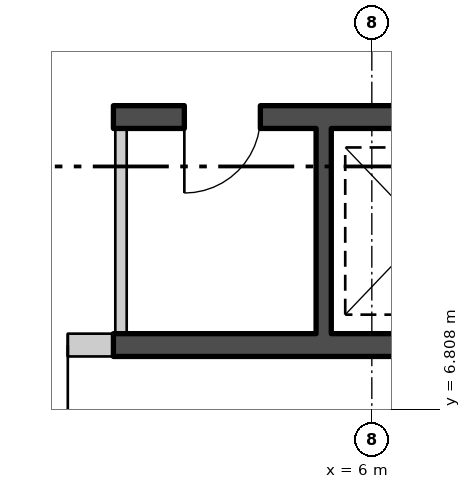
"""IFC4 building model, lengths in metres.
Left out: names, types, materials, properties, quantities, classifications, styles, units other than length and angle.
Written with IfcOpenShell. Run it as: python <this file> out.ifc"""

import sys

from ifc_helpers import new_model, si_unit, direction, frame, frame_2d, origin, place, context, subcontext, project, spatial, polyline, rectangle, outline, extrude, element, fill, save


model = new_model("IFC4")
c1 = context("Model", 3, precision=1e-05, world=origin(), true_north=direction((0.0, 1.0)))
c2 = subcontext(c1, "Body", "Model", "MODEL_VIEW")
j1 = project(units=[si_unit("LENGTHUNIT", "METRE"), si_unit("PLANEANGLEUNIT", "RADIAN")], contexts=[c1])
p1 = place(None, origin())
s1 = spatial("IfcSite", under=j1, at=p1, CompositionType="ELEMENT")
p2 = place(p1, origin())
s2 = spatial("IfcBuilding", under=s1, at=p2, CompositionType="ELEMENT")
p3 = place(p2, frame((0.0, 0.0, 227.7)))
s3 = spatial("IfcBuildingStorey", under=s2, at=p3, CompositionType="ELEMENT", Elevation=227.7)
p4 = place(p3, frame((3.21, -25.189, -0.18), z_axis=(0.0, 0.0, 1.0), x_axis=(0.499999194392, 0.866025868902, 0.0)))
e1 = element("IfcWall", 1, at=p4, inside=s3, PredefinedType="SOLIDWALL", context=c2, shape_type="SweptSolid", body=[
    extrude(outline(polyline([(-0.13, -0.225), (45.86, -0.225), (45.6, 0.225), (0.13, 0.225), (-0.13, -0.225)])), origin(), (0.0, 0.0, 1.0), 3.68),
])
p5 = place(p4, frame((1.424, 0.0, 1.08)))
e2 = element("IfcOpeningElement", 2, at=p5, cuts=e1, PredefinedType="OPENING", context=c2, shape_type="SweptSolid", body=[
    extrude(rectangle(XDim=2.4, YDim=2.0, at=frame_2d((1.2, 1.0))), frame((0.0, 0.235, 0.0), z_axis=(0.0, -1.0, 0.0), x_axis=(1.0, 0.0, 0.0)), (0.0, 0.0, 1.0), 0.47),
])
p6 = place(p4, frame((5.892, 0.0, 1.08)))
e3 = element("IfcOpeningElement", 3, at=p6, cuts=e1, PredefinedType="OPENING", context=c2, shape_type="SweptSolid", body=[
    extrude(rectangle(XDim=2.4, YDim=2.0, at=frame_2d((1.2, 1.0))), frame((0.0, 0.235, 0.0), z_axis=(0.0, -1.0, 0.0), x_axis=(1.0, 0.0, 0.0)), (0.0, 0.0, 1.0), 0.47),
])
p7 = place(p4, frame((10.399, 0.0, 1.08)))
e4 = element("IfcOpeningElement", 4, at=p7, cuts=e1, PredefinedType="OPENING", context=c2, shape_type="SweptSolid", body=[
    extrude(rectangle(XDim=2.4, YDim=2.0, at=frame_2d((1.2, 1.0))), frame((0.0, 0.235, 0.0), z_axis=(0.0, -1.0, 0.0), x_axis=(1.0, 0.0, 0.0)), (0.0, 0.0, 1.0), 0.47),
])
p8 = place(p4, frame((14.905, 0.0, 1.08)))
e5 = element("IfcOpeningElement", 5, at=p8, cuts=e1, PredefinedType="OPENING", context=c2, shape_type="SweptSolid", body=[
    extrude(rectangle(XDim=2.4, YDim=2.0, at=frame_2d((1.2, 1.0))), frame((0.0, 0.235, 0.0), z_axis=(0.0, -1.0, 0.0), x_axis=(1.0, 0.0, 0.0)), (0.0, 0.0, 1.0), 0.47),
])
p9 = place(p4, frame((19.412, 0.0, 1.08)))
e6 = element("IfcOpeningElement", 6, at=p9, cuts=e1, PredefinedType="OPENING", context=c2, shape_type="SweptSolid", body=[
    extrude(rectangle(XDim=2.4, YDim=2.0, at=frame_2d((1.2, 1.0))), frame((0.0, 0.235, 0.0), z_axis=(0.0, -1.0, 0.0), x_axis=(1.0, 0.0, 0.0)), (0.0, 0.0, 1.0), 0.47),
])
p10 = place(p4, frame((23.918, 0.0, 1.08)))
e7 = element("IfcOpeningElement", 7, at=p10, cuts=e1, PredefinedType="OPENING", context=c2, shape_type="SweptSolid", body=[
    extrude(rectangle(XDim=2.4, YDim=2.0, at=frame_2d((1.2, 1.0))), frame((0.0, 0.235, 0.0), z_axis=(0.0, -1.0, 0.0), x_axis=(1.0, 0.0, 0.0)), (0.0, 0.0, 1.0), 0.47),
])
p11 = place(p4, frame((32.932, 0.0, 1.08)))
e8 = element("IfcOpeningElement", 8, at=p11, cuts=e1, PredefinedType="OPENING", context=c2, shape_type="SweptSolid", body=[
    extrude(rectangle(XDim=2.4, YDim=2.0, at=frame_2d((1.2, 1.0))), frame((0.0, 0.235, 0.0), z_axis=(0.0, -1.0, 0.0), x_axis=(1.0, 0.0, 0.0)), (0.0, 0.0, 1.0), 0.47),
])
p12 = place(p4, frame((37.438, 0.0, 1.08)))
e9 = element("IfcOpeningElement", 9, at=p12, cuts=e1, PredefinedType="OPENING", context=c2, shape_type="SweptSolid", body=[
    extrude(rectangle(XDim=2.4, YDim=2.0, at=frame_2d((1.2, 1.0))), frame((0.0, 0.235, 0.0), z_axis=(0.0, -1.0, 0.0), x_axis=(1.0, 0.0, 0.0)), (0.0, 0.0, 1.0), 0.47),
])
p13 = place(p4, frame((41.907, 0.0, 1.08)))
e10 = element("IfcOpeningElement", 10, at=p13, cuts=e1, PredefinedType="OPENING", context=c2, shape_type="SweptSolid", body=[
    extrude(rectangle(XDim=2.4, YDim=2.0, at=frame_2d((1.2, 1.0))), frame((0.0, 0.235, 0.0), z_axis=(0.0, -1.0, 0.0), x_axis=(1.0, 0.0, 0.0)), (0.0, 0.0, 1.0), 0.47),
])
p14 = place(p3, frame((2.6, 10.65, 0.0), z_axis=(0.0, 0.0, 1.0), x_axis=(1.0, 0.0, 0.0)))
e11 = element("IfcWall", 11, at=p14, inside=s3, PredefinedType="SHEAR", context=c2, shape_type="SweptSolid", body=[
    extrude(rectangle(XDim=8.1, YDim=0.3, at=frame_2d((4.05, 0.0))), origin(), (0.0, 0.0, 1.0), 3.7),
])
p15 = place(p14, frame((0.933, 0.0, 0.0)))
e12 = element("IfcOpeningElement", 12, at=p15, cuts=e11, PredefinedType="OPENING", context=c2, shape_type="SweptSolid", body=[
    extrude(rectangle(XDim=1.0, YDim=2.1, at=frame_2d((0.5, 1.05))), frame((0.0, 0.16, 0.0), z_axis=(0.0, -1.0, 0.0), x_axis=(1.0, 0.0, 0.0)), (0.0, 0.0, 1.0), 0.32),
])
p16 = place(p3, frame((2.6, 7.65, 0.0), z_axis=(0.0, 0.0, 1.0), x_axis=(1.0, 0.0, 0.0)))
e13 = element("IfcWall", 13, at=p16, inside=s3, PredefinedType="SHEAR", context=c2, shape_type="SweptSolid", body=[
    extrude(rectangle(XDim=8.1, YDim=0.3, at=frame_2d((4.05, 0.0))), origin(), (0.0, 0.0, 1.0), 3.7),
])
p17 = place(p3, frame((2.7, 7.8, 0.0), z_axis=(0.0, 0.0, 1.0), x_axis=(0.0, 1.0, 0.0)))
e14 = element("IfcWall", 14, at=p17, inside=s3, PredefinedType="PARTITIONING", context=c2, shape_type="SweptSolid", body=[
    extrude(rectangle(XDim=2.7, YDim=0.15, at=frame_2d((1.35, 0.0))), origin(), (0.0, 0.0, 1.0), 3.7),
])
p18 = place(p3, frame((5.367, 7.8, 0.0), z_axis=(0.0, 0.0, 1.0), x_axis=(0.0, 1.0, 0.0)))
e15 = element("IfcWall", 15, at=p18, inside=s3, PredefinedType="SHEAR", context=c2, shape_type="SweptSolid", body=[
    extrude(rectangle(XDim=2.7, YDim=0.2, at=frame_2d((1.35, 0.0))), origin(), (0.0, 0.0, 1.0), 3.7),
])
p19 = place(p3, frame((-0.4, 7.65, 0.0), z_axis=(0.0, 0.0, 1.0), x_axis=(1.0, 0.0, 0.0)))
e16 = element("IfcWall", 16, at=p19, inside=s3, PredefinedType="PARTITIONING", context=c2, shape_type="SweptSolid", body=[
    extrude(rectangle(XDim=3.0, YDim=0.3, at=frame_2d((1.5, 0.0))), origin(), (0.0, 0.0, 1.0), 3.7),
])
p20 = place(p19, frame((0.6, 0.0, 0.0)))
e17 = element("IfcOpeningElement", 17, at=p20, cuts=e16, PredefinedType="OPENING", context=c2, shape_type="SweptSolid", body=[
    extrude(rectangle(XDim=1.8, YDim=2.4, at=frame_2d((0.9, 1.2))), frame((0.0, 0.16, 0.0), z_axis=(0.0, -1.0, 0.0), x_axis=(1.0, 0.0, 0.0)), (0.0, 0.0, 1.0), 0.32),
])
p21 = place(p15, origin())
e18 = element("IfcDoor", 18, at=p21, inside=s3, OperationType="SINGLE_SWING_LEFT", PredefinedType="DOOR", context=c2, shape_type="SweptSolid", body=[
    extrude(rectangle(XDim=1.0, YDim=2.1, at=frame_2d((0.5, 1.05))), frame((0.0, 0.025, 0.0), z_axis=(0.0, -1.0, 0.0), x_axis=(1.0, 0.0, 0.0)), (0.0, 0.0, 1.0), 0.05),
])
fill(e12, e18)
p22 = place(p20, origin())
e19 = element("IfcDoor", 19, at=p22, inside=s3, OperationType="DOUBLE_DOOR_SINGLE_SWING", PredefinedType="DOOR", context=c2, shape_type="SweptSolid", body=[
    extrude(rectangle(XDim=1.8, YDim=2.4, at=frame_2d((0.9, 1.2))), frame((0.0, 0.025, 0.0), z_axis=(0.0, -1.0, 0.0), x_axis=(1.0, 0.0, 0.0)), (0.0, 0.0, 1.0), 0.05),
])
fill(e17, e19)
save(model, sys.argv[1])
